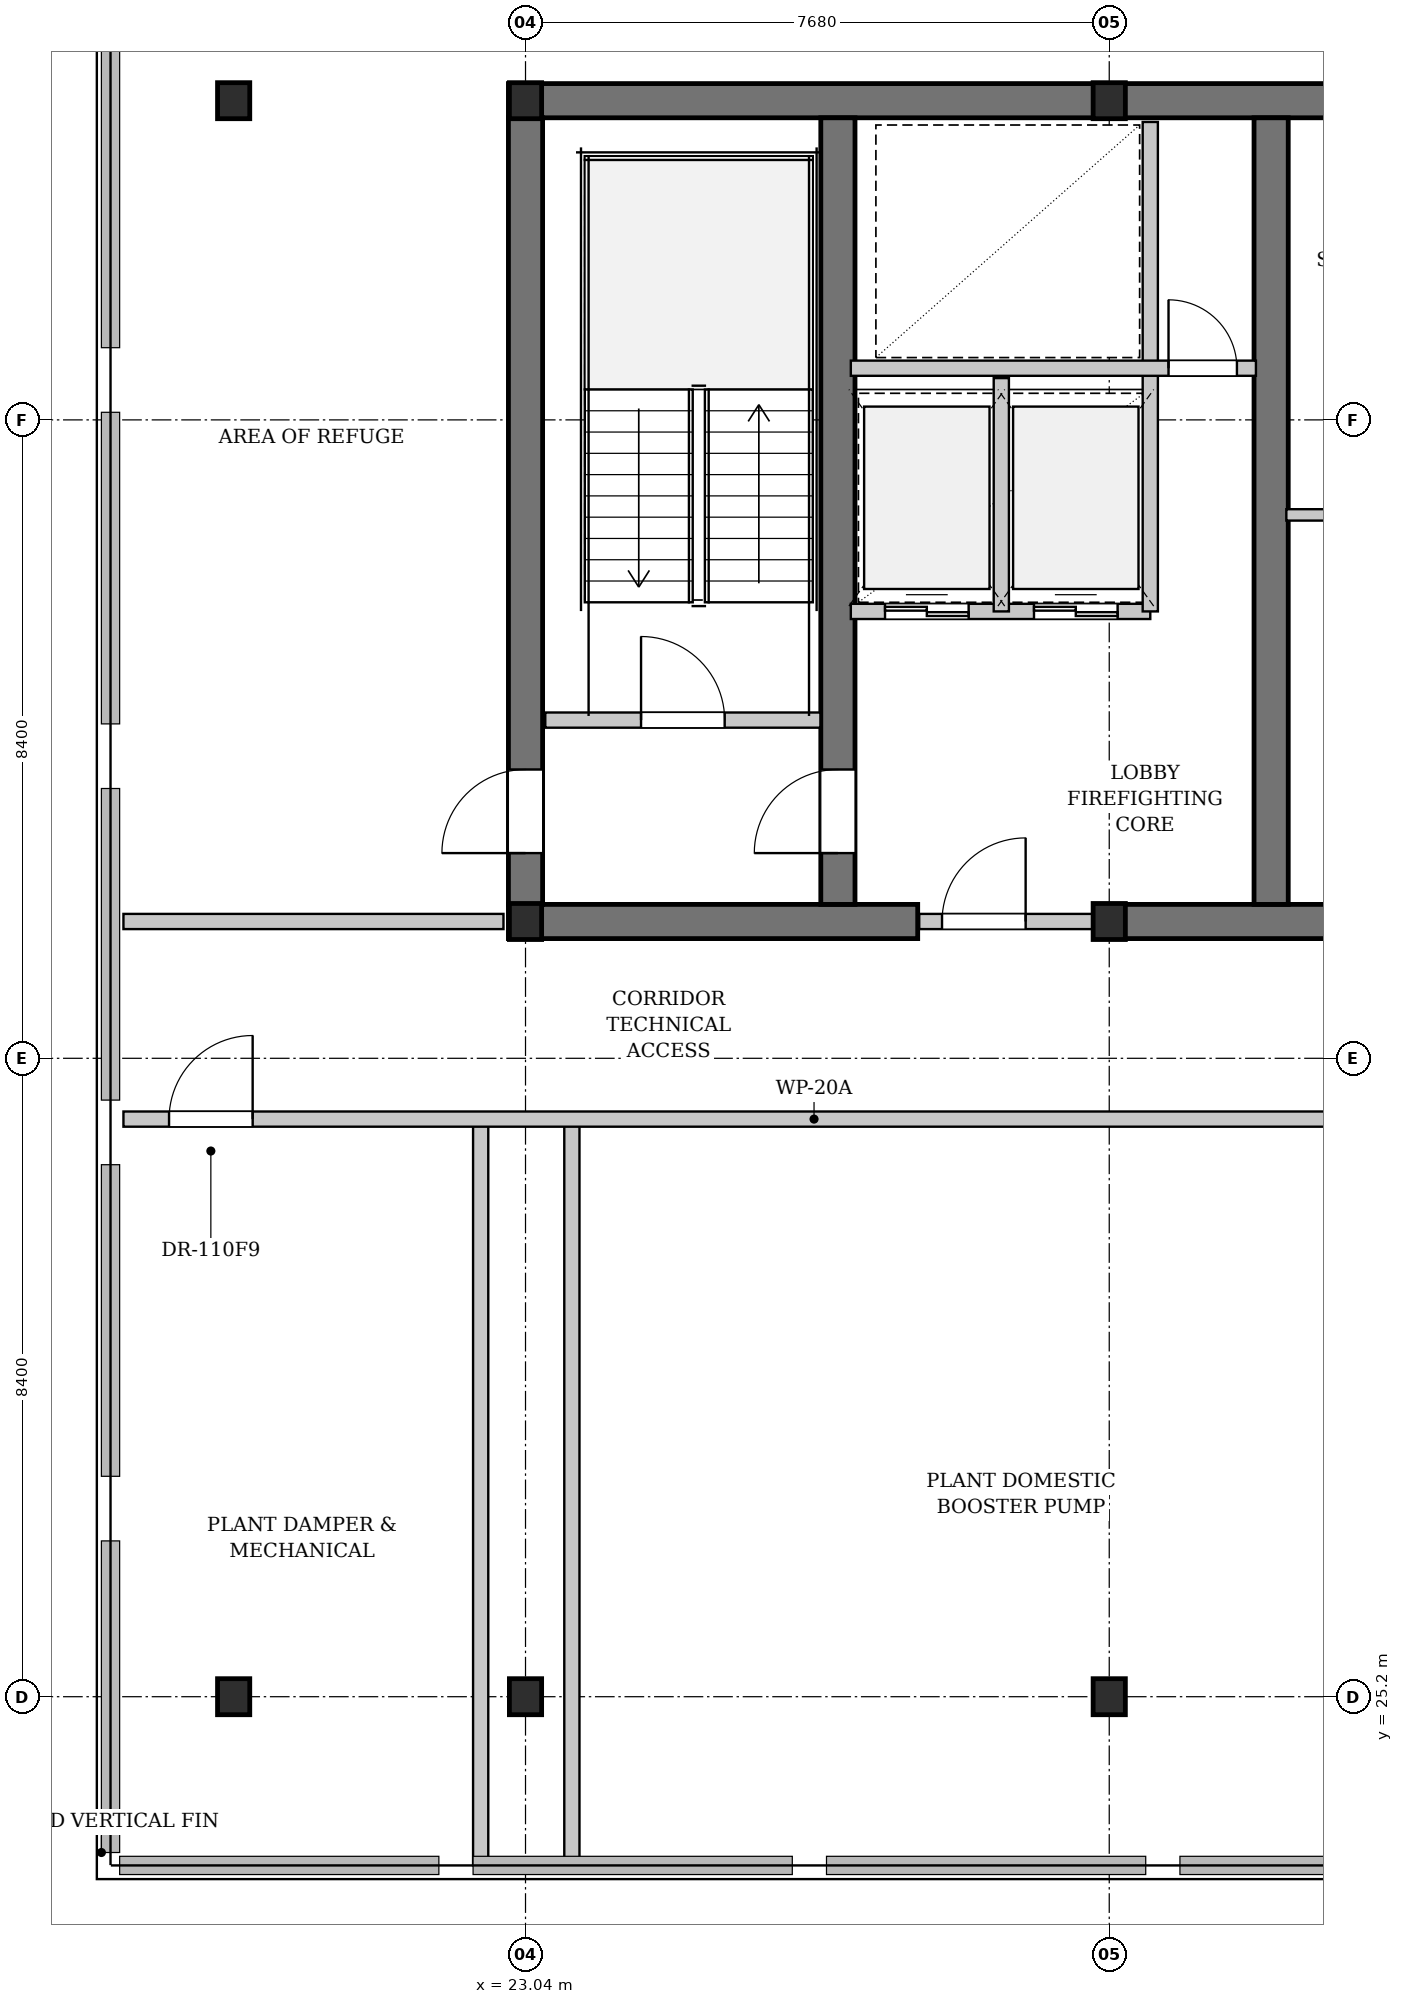
"""IFC4 building model, lengths in metres.
Left out: names, types, materials, properties, quantities, classifications, styles, units other than length and angle.
Written with IfcOpenShell. Run it as: python <this file> out.ifc"""

import sys

from ifc_helpers import new_model, si_unit, direction, frame, frame_2d, origin, origin_2d, place, context, subcontext, project, spatial, rectangle, i_section, extrude, element, fill, save


model = new_model("IFC4")
c1 = context("Model", 3, precision=1e-05, world=origin(), true_north=direction((0.0, 1.0)))
c2 = subcontext(c1, "Body", "Model", "MODEL_VIEW")
j1 = project(units=[si_unit("LENGTHUNIT", "METRE"), si_unit("PLANEANGLEUNIT", "RADIAN")], contexts=[c1])
p1 = place(None, origin())
s1 = spatial("IfcSite", under=j1, at=p1, CompositionType="ELEMENT")
p2 = place(p1, origin())
s2 = spatial("IfcBuilding", under=s1, at=p2, CompositionType="ELEMENT")
p3 = place(p2, frame((0.0, 0.0, 145.1)))
s3 = spatial("IfcBuildingStorey", under=s2, at=p3, CompositionType="ELEMENT", Elevation=145.1)
p4 = place(p3, frame((22.815, 46.2, 0.0), z_axis=(0.0, 0.0, 1.0), x_axis=(1.0, 0.0, 0.0)))
e1 = element("IfcWall", 1, at=p4, inside=s3, PredefinedType="SHEAR", context=c2, shape_type="SweptSolid", body=[
    extrude(rectangle(XDim=31.17, YDim=0.45, at=frame_2d((15.585, 0.0))), origin(), (0.0, 0.0, 1.0), 3.48),
])
p5 = place(p3, frame((22.815, 35.4, 0.0), z_axis=(0.0, 0.0, 1.0), x_axis=(1.0, 0.0, 0.0)))
e2 = element("IfcWall", 2, at=p5, inside=s3, PredefinedType="SHEAR", context=c2, shape_type="SweptSolid", body=[
    extrude(rectangle(XDim=5.385, YDim=0.45, at=frame_2d((2.692, 0.0))), origin(), (0.0, 0.0, 1.0), 3.48),
])
p6 = place(p3, frame((30.72, 35.4, 0.0), z_axis=(0.0, 0.0, 1.0), x_axis=(1.0, 0.0, 0.0)))
e3 = element("IfcWall", 3, at=p6, inside=s3, PredefinedType="SHEAR", context=c2, shape_type="SweptSolid", body=[
    extrude(rectangle(XDim=4.88, YDim=0.45, at=frame_2d((2.44, 0.0))), origin(), (0.0, 0.0, 1.0), 3.48),
])
p7 = place(p3, frame((23.04, 35.625, 0.0), z_axis=(0.0, 0.0, 1.0), x_axis=(0.0, 1.0, 0.0)))
e4 = element("IfcWall", 4, at=p7, inside=s3, PredefinedType="SHEAR", context=c2, shape_type="SweptSolid", body=[
    extrude(rectangle(XDim=10.35, YDim=0.45, at=frame_2d((5.175, 0.0))), origin(), (0.0, 0.0, 1.0), 3.48),
])
p8 = place(p7, frame((0.675, 0.0, 0.0)))
e5 = element("IfcOpeningElement", 5, at=p8, cuts=e4, PredefinedType="OPENING", context=c2, shape_type="SweptSolid", body=[
    extrude(rectangle(XDim=1.1, YDim=2.15, at=frame_2d((0.55, 1.075))), frame((0.0, 0.235, 0.0), z_axis=(0.0, -1.0, 0.0), x_axis=(1.0, 0.0, 0.0)), (0.0, 0.0, 1.0), 0.47),
])
p9 = place(p3, frame((27.15, 35.625, 0.0), z_axis=(0.0, 0.0, 1.0), x_axis=(0.0, 1.0, 0.0)))
e6 = element("IfcWall", 6, at=p9, inside=s3, PredefinedType="SHEAR", context=c2, shape_type="SweptSolid", body=[
    extrude(rectangle(XDim=10.35, YDim=0.45, at=frame_2d((5.175, 0.0))), origin(), (0.0, 0.0, 1.0), 3.48),
])
p10 = place(p9, frame((0.675, 0.0, 0.0)))
e7 = element("IfcOpeningElement", 7, at=p10, cuts=e6, PredefinedType="OPENING", context=c2, shape_type="SweptSolid", body=[
    extrude(rectangle(XDim=1.1, YDim=2.15, at=frame_2d((0.55, 1.075))), frame((0.0, 0.235, 0.0), z_axis=(0.0, -1.0, 0.0), x_axis=(1.0, 0.0, 0.0)), (0.0, 0.0, 1.0), 0.47),
])
p11 = place(p3, frame((32.85, 35.625, 0.0), z_axis=(0.0, 0.0, 1.0), x_axis=(0.0, 1.0, 0.0)))
e8 = element("IfcWall", 8, at=p11, inside=s3, PredefinedType="SHEAR", context=c2, shape_type="SweptSolid", body=[
    extrude(rectangle(XDim=10.35, YDim=0.45, at=frame_2d((5.175, 0.0))), origin(), (0.0, 0.0, 1.0), 3.48),
])
for number, where, z_axis, x_axis in (
    (9, (23.04, 35.4, 0.0), (0.0, 0.0, 1.0), (1.0, 0.0, 0.0)),
    (10, (23.04, 46.2, 0.0), (0.0, 0.0, 1.0), (1.0, 0.0, 0.0)),
    (11, (23.04, 25.2, 0.0), (0.0, 0.0, 1.0), (1.0, 0.0, 0.0)),
    (12, (30.72, 35.4, 0.0), (0.0, 0.0, 1.0), (1.0, 0.0, 0.0)),
    (13, (30.72, 46.2, 0.0), (0.0, 0.0, 1.0), (1.0, 0.0, 0.0)),
    (14, (30.72, 25.2, 0.0), (0.0, 0.0, 1.0), (1.0, 0.0, 0.0)),
    (15, (19.2, 25.2, 0.0), (0.0, 0.0, 1.0), (1.0, 0.0, 0.0)),
    (16, (19.2, 46.2, 0.0), (0.0, 0.0, 1.0), (1.0, 0.0, 0.0)),
):
    element("IfcColumn", number, at=place(p3, frame(where, z_axis=z_axis, x_axis=x_axis)), inside=s3, PredefinedType="COLUMN", context=c2, shape_type="SweptSolid", body=[
        extrude(i_section(OverallWidth=0.424, OverallDepth=0.474, WebThickness=0.047, FlangeThickness=0.077, FilletRadius=0.015, at=origin_2d()), origin(), (0.0, 0.0, 1.0), 3.9),
    ])
p12 = place(p3, frame((23.3, 38.05, 0.0), z_axis=(0.0, 0.0, 1.0), x_axis=(1.0, 0.0, 0.0)))
e17 = element("IfcWall", 17, at=p12, inside=s3, PredefinedType="PARTITIONING", context=c2, shape_type="SweptSolid", body=[
    extrude(rectangle(XDim=3.62, YDim=0.2, at=frame_2d((1.81, 0.0))), origin(), (0.0, 0.0, 1.0), 3.48),
])
p13 = place(p12, frame((1.26, 0.0, 0.0)))
e18 = element("IfcOpeningElement", 18, at=p13, cuts=e17, PredefinedType="OPENING", context=c2, shape_type="SweptSolid", body=[
    extrude(rectangle(XDim=1.1, YDim=2.15, at=frame_2d((0.55, 1.075))), frame((0.0, 0.11, 0.0), z_axis=(0.0, -1.0, 0.0), x_axis=(1.0, 0.0, 0.0)), (0.0, 0.0, 1.0), 0.22),
])
p14 = place(p3, frame((28.22, 35.4, 0.0), z_axis=(0.0, 0.0, 1.0), x_axis=(1.0, 0.0, 0.0)))
e19 = element("IfcWall", 19, at=p14, inside=s3, PredefinedType="PARTITIONING", context=c2, shape_type="SweptSolid", body=[
    extrude(rectangle(XDim=2.5, YDim=0.2, at=frame_2d((1.25, 0.0))), origin(), (0.0, 0.0, 1.0), 2.565),
])
p15 = place(p14, frame((0.3, 0.0, 0.0)))
e20 = element("IfcOpeningElement", 20, at=p15, cuts=e19, PredefinedType="OPENING", context=c2, shape_type="SweptSolid", body=[
    extrude(rectangle(XDim=1.1, YDim=2.15, at=frame_2d((0.55, 1.075))), frame((0.0, 0.11, 0.0), z_axis=(0.0, -1.0, 0.0), x_axis=(1.0, 0.0, 0.0)), (0.0, 0.0, 1.0), 0.22),
])
p16 = place(p3, frame((27.32, 39.48, 0.0), z_axis=(0.0, 0.0, 1.0), x_axis=(1.0, 0.0, 0.0)))
e21 = element("IfcWall", 21, at=p16, inside=s3, PredefinedType="PARTITIONING", context=c2, shape_type="SweptSolid", body=[
    extrude(rectangle(XDim=3.94, YDim=0.2, at=frame_2d((1.97, 0.0))), origin(), (0.0, 0.0, 1.0), 3.48),
])
p17 = place(p16, frame((0.45, 0.0, 0.0)))
e22 = element("IfcOpeningElement", 22, at=p17, cuts=e21, PredefinedType="OPENING", context=c2, shape_type="SweptSolid", body=[
    extrude(rectangle(XDim=1.1, YDim=2.2, at=frame_2d((0.55, 1.1))), frame((0.0, 0.11, 0.0), z_axis=(0.0, -1.0, 0.0), x_axis=(1.0, 0.0, 0.0)), (0.0, 0.0, 1.0), 0.22),
])
p18 = place(p16, frame((2.41, 0.0, 0.0)))
e23 = element("IfcOpeningElement", 23, at=p18, cuts=e21, PredefinedType="OPENING", context=c2, shape_type="SweptSolid", body=[
    extrude(rectangle(XDim=1.1, YDim=2.2, at=frame_2d((0.55, 1.1))), frame((0.0, 0.11, 0.0), z_axis=(0.0, -1.0, 0.0), x_axis=(1.0, 0.0, 0.0)), (0.0, 0.0, 1.0), 0.22),
])
p19 = place(p3, frame((29.3, 39.48, 0.0), z_axis=(0.0, 0.0, 1.0), x_axis=(0.0, 1.0, 0.0)))
e24 = element("IfcWall", 24, at=p19, inside=s3, PredefinedType="PARTITIONING", context=c2, shape_type="SweptSolid", body=[
    extrude(rectangle(XDim=3.07, YDim=0.2, at=frame_2d((1.535, 0.0))), origin(), (0.0, 0.0, 1.0), 3.48),
])
p20 = place(p3, frame((31.26, 39.48, 0.0), z_axis=(0.0, 0.0, 1.0), x_axis=(0.0, 1.0, 0.0)))
e25 = element("IfcWall", 25, at=p20, inside=s3, PredefinedType="PARTITIONING", context=c2, shape_type="SweptSolid", body=[
    extrude(rectangle(XDim=6.44, YDim=0.2, at=frame_2d((3.22, 0.0))), origin(), (0.0, 0.0, 1.0), 3.48),
])
p21 = place(p3, frame((27.32, 42.68, 0.0), z_axis=(0.0, 0.0, 1.0), x_axis=(1.0, 0.0, 0.0)))
e26 = element("IfcWall", 26, at=p21, inside=s3, PredefinedType="PARTITIONING", context=c2, shape_type="SweptSolid", body=[
    extrude(rectangle(XDim=5.33, YDim=0.2, at=frame_2d((2.665, 0.0))), origin(), (0.0, 0.0, 1.0), 3.48),
])
p22 = place(p21, frame((4.18, 0.0, 0.0)))
e27 = element("IfcOpeningElement", 27, at=p22, cuts=e26, PredefinedType="OPENING", context=c2, shape_type="SweptSolid", body=[
    extrude(rectangle(XDim=0.9, YDim=2.15, at=frame_2d((0.45, 1.075))), frame((0.0, 0.11, 0.0), z_axis=(0.0, -1.0, 0.0), x_axis=(1.0, 0.0, 0.0)), (0.0, 0.0, 1.0), 0.22),
])
p23 = place(p3, frame((33.05, 40.75, 0.0), z_axis=(0.0, 0.0, 1.0), x_axis=(1.0, 0.0, 0.0)))
e28 = element("IfcWall", 28, at=p23, inside=s3, PredefinedType="PARTITIONING", context=c2, shape_type="SweptSolid", body=[
    extrude(rectangle(XDim=3.57, YDim=0.15, at=frame_2d((1.785, 0.0))), origin(), (0.0, 0.0, 1.0), 3.48),
])
p24 = place(p3, frame((17.75, 35.4, 0.0), z_axis=(0.0, 0.0, 1.0), x_axis=(1.0, 0.0, 0.0)))
e29 = element("IfcWall", 29, at=p24, inside=s3, PredefinedType="PARTITIONING", context=c2, shape_type="SweptSolid", body=[
    extrude(rectangle(XDim=5.0, YDim=0.2, at=frame_2d((2.5, 0.0))), origin(), (0.0, 0.0, 1.0), 3.48),
])
p25 = place(p3, frame((22.45, 22.98, 0.0), z_axis=(0.0, 0.0, 1.0), x_axis=(0.0, 1.0, 0.0)))
e30 = element("IfcWall", 30, at=p25, inside=s3, PredefinedType="PARTITIONING", context=c2, shape_type="SweptSolid", body=[
    extrude(rectangle(XDim=9.82, YDim=0.2, at=frame_2d((4.91, 0.0))), origin(), (0.0, 0.0, 1.0), 2.275),
])
p26 = place(p3, frame((23.65, 22.98, 0.0), z_axis=(0.0, 0.0, 1.0), x_axis=(0.0, 1.0, 0.0)))
e31 = element("IfcWall", 31, at=p26, inside=s3, PredefinedType="PARTITIONING", context=c2, shape_type="SweptSolid", body=[
    extrude(rectangle(XDim=9.82, YDim=0.2, at=frame_2d((4.91, 0.0))), origin(), (0.0, 0.0, 1.0), 3.48),
])
p27 = place(p3, frame((17.75, 32.8, 0.0), z_axis=(0.0, 0.0, 1.0), x_axis=(1.0, 0.0, 0.0)))
e32 = element("IfcWall", 32, at=p27, inside=s3, PredefinedType="PARTITIONING", context=c2, shape_type="SweptSolid", body=[
    extrude(rectangle(XDim=41.3, YDim=0.2, at=frame_2d((20.65, 0.0))), origin(), (0.0, 0.0, 1.0), 3.48),
])
p28 = place(p27, frame((0.6, 0.0, 0.0)))
e33 = element("IfcOpeningElement", 33, at=p28, cuts=e32, PredefinedType="OPENING", context=c2, shape_type="SweptSolid", body=[
    extrude(rectangle(XDim=1.1, YDim=2.15, at=frame_2d((0.55, 1.075))), frame((0.0, 0.11, 0.0), z_axis=(0.0, -1.0, 0.0), x_axis=(1.0, 0.0, 0.0)), (0.0, 0.0, 1.0), 0.22),
])
p29 = place(p27, frame((16.244, 0.0, 0.0)))
e34 = element("IfcOpeningElement", 34, at=p29, cuts=e32, PredefinedType="OPENING", context=c2, shape_type="SweptSolid", body=[
    extrude(rectangle(XDim=1.1, YDim=2.15, at=frame_2d((0.55, 1.075))), frame((0.0, 0.11, 0.0), z_axis=(0.0, -1.0, 0.0), x_axis=(1.0, 0.0, 0.0)), (0.0, 0.0, 1.0), 0.22),
])
p30 = place(p27, frame((23.945, 0.0, 0.0)))
e35 = element("IfcOpeningElement", 35, at=p30, cuts=e32, PredefinedType="OPENING", context=c2, shape_type="SweptSolid", body=[
    extrude(rectangle(XDim=1.1, YDim=2.15, at=frame_2d((0.55, 1.075))), frame((0.0, 0.11, 0.0), z_axis=(0.0, -1.0, 0.0), x_axis=(1.0, 0.0, 0.0)), (0.0, 0.0, 1.0), 0.22),
])
p31 = place(p27, frame((39.6, 0.0, 0.0)))
e36 = element("IfcOpeningElement", 36, at=p31, cuts=e32, PredefinedType="OPENING", context=c2, shape_type="SweptSolid", body=[
    extrude(rectangle(XDim=1.1, YDim=2.15, at=frame_2d((0.55, 1.075))), frame((0.0, 0.11, 0.0), z_axis=(0.0, -1.0, 0.0), x_axis=(1.0, 0.0, 0.0)), (0.0, 0.0, 1.0), 0.22),
])
p32 = place(p13, origin())
e37 = element("IfcDoor", 37, at=p32, inside=s3, OperationType="SINGLE_SWING_LEFT", PredefinedType="DOOR", context=c2, shape_type="SweptSolid", body=[
    extrude(rectangle(XDim=1.1, YDim=2.15, at=frame_2d((0.55, 1.075))), frame((0.0, 0.025, 0.0), z_axis=(0.0, -1.0, 0.0), x_axis=(1.0, 0.0, 0.0)), (0.0, 0.0, 1.0), 0.05),
])
fill(e18, e37)
p33 = place(p15, origin())
e38 = element("IfcDoor", 38, at=p33, inside=s3, OperationType="SINGLE_SWING_RIGHT", PredefinedType="DOOR", context=c2, shape_type="SweptSolid", body=[
    extrude(rectangle(XDim=1.1, YDim=2.15, at=frame_2d((0.55, 1.075))), frame((0.0, 0.025, 0.0), z_axis=(0.0, -1.0, 0.0), x_axis=(1.0, 0.0, 0.0)), (0.0, 0.0, 1.0), 0.05),
])
fill(e20, e38)
p34 = place(p17, origin())
e39 = element("IfcDoor", 39, at=p34, inside=s3, OperationType="DOUBLE_DOOR_SLIDING", PredefinedType="DOOR", context=c2, shape_type="SweptSolid", body=[
    extrude(rectangle(XDim=1.1, YDim=2.2, at=frame_2d((0.55, 1.1))), frame((0.0, 0.025, 0.0), z_axis=(0.0, -1.0, 0.0), x_axis=(1.0, 0.0, 0.0)), (0.0, 0.0, 1.0), 0.05),
])
fill(e22, e39)
p35 = place(p18, origin())
e40 = element("IfcDoor", 40, at=p35, inside=s3, OperationType="DOUBLE_DOOR_SLIDING", PredefinedType="DOOR", context=c2, shape_type="SweptSolid", body=[
    extrude(rectangle(XDim=1.1, YDim=2.2, at=frame_2d((0.55, 1.1))), frame((0.0, 0.025, 0.0), z_axis=(0.0, -1.0, 0.0), x_axis=(1.0, 0.0, 0.0)), (0.0, 0.0, 1.0), 0.05),
])
fill(e23, e40)
p36 = place(p22, origin())
e41 = element("IfcDoor", 41, at=p36, inside=s3, OperationType="SINGLE_SWING_LEFT", PredefinedType="DOOR", context=c2, shape_type="SweptSolid", body=[
    extrude(rectangle(XDim=0.9, YDim=2.15, at=frame_2d((0.45, 1.075))), frame((0.0, 0.025, 0.0), z_axis=(0.0, -1.0, 0.0), x_axis=(1.0, 0.0, 0.0)), (0.0, 0.0, 1.0), 0.05),
])
fill(e27, e41)
p37 = place(p28, origin())
e42 = element("IfcDoor", 42, at=p37, inside=s3, OperationType="SINGLE_SWING_RIGHT", PredefinedType="DOOR", context=c2, shape_type="SweptSolid", body=[
    extrude(rectangle(XDim=1.1, YDim=2.15, at=frame_2d((0.55, 1.075))), frame((0.0, 0.025, 0.0), z_axis=(0.0, -1.0, 0.0), x_axis=(1.0, 0.0, 0.0)), (0.0, 0.0, 1.0), 0.05),
])
fill(e33, e42)
p38 = place(p10, origin())
e43 = element("IfcDoor", 43, at=p38, inside=s3, OperationType="SINGLE_SWING_LEFT", PredefinedType="DOOR", context=c2, shape_type="SweptSolid", body=[
    extrude(rectangle(XDim=1.1, YDim=2.15, at=frame_2d((0.55, 1.075))), frame((0.0, 0.025, 0.0), z_axis=(0.0, -1.0, 0.0), x_axis=(1.0, 0.0, 0.0)), (0.0, 0.0, 1.0), 0.05),
])
fill(e7, e43)
p39 = place(p8, origin())
e44 = element("IfcDoor", 44, at=p39, inside=s3, OperationType="SINGLE_SWING_LEFT", PredefinedType="DOOR", context=c2, shape_type="SweptSolid", body=[
    extrude(rectangle(XDim=1.1, YDim=2.15, at=frame_2d((0.55, 1.075))), frame((0.0, 0.025, 0.0), z_axis=(0.0, -1.0, 0.0), x_axis=(1.0, 0.0, 0.0)), (0.0, 0.0, 1.0), 0.05),
])
fill(e5, e44)
save(model, sys.argv[1])
